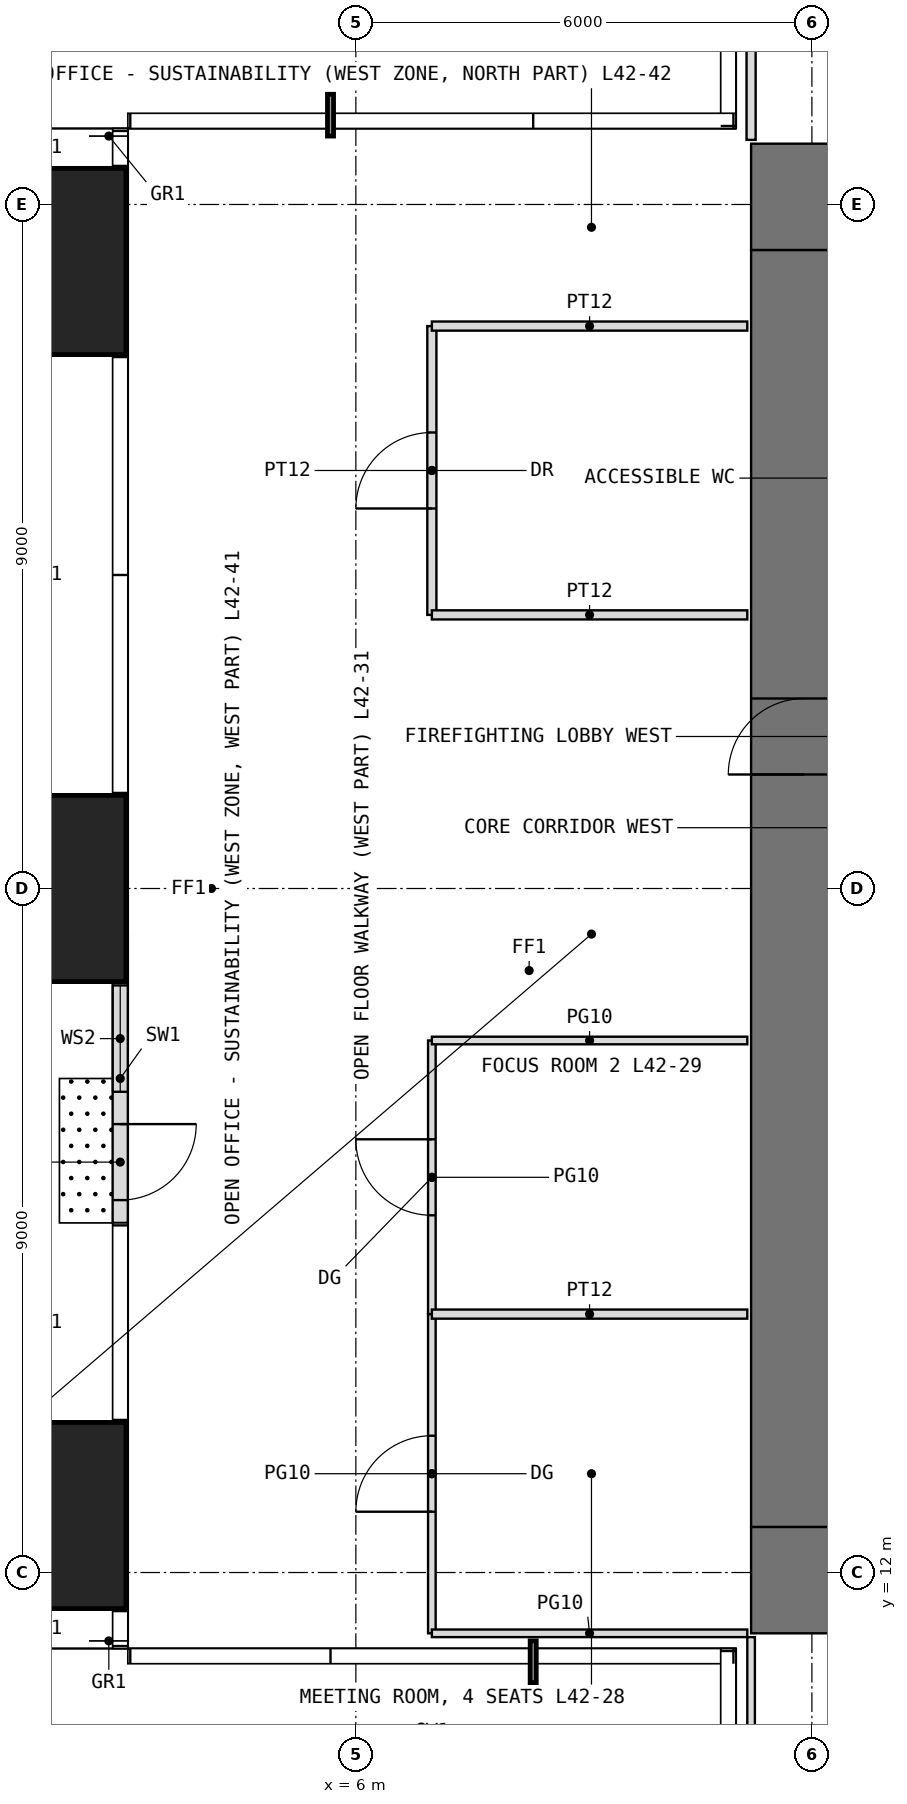
"""IFC4 building model, lengths in metres.
Left out: names, types, materials, properties, quantities, classifications, styles, units other than length and angle.
Written with IfcOpenShell. Run it as: python <this file> out.ifc"""

import sys

from ifc_helpers import new_model, si_unit, direction, frame, frame_2d, origin, origin_2d, place, context, subcontext, project, spatial, rectangle, extrude, element, fill, save


model = new_model("IFC4")
c1 = context("Model", 3, precision=1e-05, world=origin(), true_north=direction((0.0, 1.0)))
c2 = subcontext(c1, "Body", "Model", "MODEL_VIEW")
j1 = project(units=[si_unit("LENGTHUNIT", "METRE"), si_unit("PLANEANGLEUNIT", "RADIAN")], contexts=[c1])
p1 = place(None, origin())
s1 = spatial("IfcSite", under=j1, at=p1, CompositionType="ELEMENT")
p2 = place(p1, origin())
s2 = spatial("IfcBuilding", under=s1, at=p2, CompositionType="ELEMENT")
p3 = place(p2, frame((0.0, 0.0, 178.5)))
s3 = spatial("IfcBuildingStorey", under=s2, at=p3, CompositionType="ELEMENT", Elevation=178.5)
for number, where, z_axis, x_axis in (
    (1, (1.75, 12.75, 0.0), (0.0, 0.0, 1.0), (1.0, 0.0, 0.0)),
    (2, (1.75, 21.0, 0.0), (0.0, 0.0, 1.0), (1.0, 0.0, 0.0)),
    (3, (1.75, 29.25, 0.0), (0.0, 0.0, 1.0), (1.0, 0.0, 0.0)),
):
    element("IfcColumn", number, at=place(p3, frame(where, z_axis=z_axis, x_axis=x_axis)), inside=s3, PredefinedType="COLUMN", context=c2, shape_type="SweptSolid", body=[
        extrude(rectangle(XDim=2.45, YDim=2.45, at=origin_2d()), origin(), (0.0, 0.0, 1.0), 4.0),
    ])
p4 = place(p3, frame((2.9, 20.4, 0.0), z_axis=(0.0, 0.0, 1.0), x_axis=(0.0, -1.0, 0.0)))
e4 = element("IfcWall", 4, at=p4, inside=s3, PredefinedType="USERDEFINED", context=c2, shape_type="SweptSolid", body=[
    extrude(rectangle(XDim=3.8, YDim=0.2, at=frame_2d((1.9, 0.0))), origin(), (0.0, 0.0, 1.0), 3.75),
])
p5 = place(p4, frame((2.5, 0.0, 0.0)))
e5 = element("IfcOpeningElement", 5, at=p5, cuts=e4, PredefinedType="OPENING", context=c2, shape_type="SweptSolid", body=[
    extrude(rectangle(XDim=1.0, YDim=2.4, at=frame_2d((0.5, 1.2))), frame((0.0, 0.11, 0.0), z_axis=(0.0, -1.0, 0.0), x_axis=(1.0, 0.0, 0.0)), (0.0, 0.0, 1.0), 0.22),
])
p6 = place(p4, frame((0.675, 0.0, 0.3)))
e6 = element("IfcOpeningElement", 6, at=p6, cuts=e4, PredefinedType="OPENING", context=c2, shape_type="SweptSolid", body=[
    extrude(rectangle(XDim=1.4, YDim=2.7, at=frame_2d((0.7, 1.35))), frame((0.0, 0.11, 0.0), z_axis=(0.0, -1.0, 0.0), x_axis=(1.0, 0.0, 0.0)), (0.0, 0.0, 1.0), 0.22),
])
p7 = place(p3, frame((11.2, 11.9, -0.05), z_axis=(0.0, 0.0, 1.0), x_axis=(1.0, 0.0, 0.0)))
e7 = element("IfcWall", 7, at=p7, inside=s3, PredefinedType="SHEAR", context=c2, shape_type="SweptSolid", body=[
    extrude(rectangle(XDim=19.6, YDim=1.4, at=frame_2d((9.8, 0.0))), origin(), (0.0, 0.0, 1.0), 4.0),
])
p8 = place(p7, frame((8.8, 0.0, 0.05)))
e8 = element("IfcOpeningElement", 8, at=p8, cuts=e7, PredefinedType="OPENING", context=c2, shape_type="SweptSolid", body=[
    extrude(rectangle(XDim=2.0, YDim=2.2, at=frame_2d((1.0, 1.1))), frame((0.0, 0.71, 0.0), z_axis=(0.0, -1.0, 0.0), x_axis=(1.0, 0.0, 0.0)), (0.0, 0.0, 1.0), 1.42),
])
p9 = place(p3, frame((11.2, 30.1, -0.05), z_axis=(0.0, 0.0, 1.0), x_axis=(1.0, 0.0, 0.0)))
e9 = element("IfcWall", 9, at=p9, inside=s3, PredefinedType="SHEAR", context=c2, shape_type="SweptSolid", body=[
    extrude(rectangle(XDim=19.6, YDim=1.4, at=frame_2d((9.8, 0.0))), origin(), (0.0, 0.0, 1.0), 4.0),
])
p10 = place(p9, frame((8.8, 0.0, 0.05)))
e10 = element("IfcOpeningElement", 10, at=p10, cuts=e9, PredefinedType="OPENING", context=c2, shape_type="SweptSolid", body=[
    extrude(rectangle(XDim=2.0, YDim=2.2, at=frame_2d((1.0, 1.1))), frame((0.0, 0.71, 0.0), z_axis=(0.0, -1.0, 0.0), x_axis=(1.0, 0.0, 0.0)), (0.0, 0.0, 1.0), 1.42),
])
p11 = place(p3, frame((11.9, 12.6, -0.05), z_axis=(0.0, 0.0, 1.0), x_axis=(0.0, 1.0, 0.0)))
e11 = element("IfcWall", 11, at=p11, inside=s3, PredefinedType="SHEAR", context=c2, shape_type="SweptSolid", body=[
    extrude(rectangle(XDim=16.8, YDim=1.4, at=frame_2d((8.4, 0.0))), origin(), (0.0, 0.0, 1.0), 4.0),
])
p12 = place(p11, frame((9.9, 0.0, 0.05)))
e12 = element("IfcOpeningElement", 12, at=p12, cuts=e11, PredefinedType="OPENING", context=c2, shape_type="SweptSolid", body=[
    extrude(rectangle(XDim=1.0, YDim=2.2, at=frame_2d((0.5, 1.1))), frame((0.0, 0.71, 0.0), z_axis=(0.0, -1.0, 0.0), x_axis=(1.0, 0.0, 0.0)), (0.0, 0.0, 1.0), 1.42),
])
p13 = place(p3, frame((7.0, 11.2, 0.0), z_axis=(0.0, 0.0, 1.0), x_axis=(0.0, 1.0, 0.0)))
e13 = element("IfcWall", 13, at=p13, inside=s3, PredefinedType="PARTITIONING", context=c2, shape_type="SweptSolid", body=[
    extrude(rectangle(XDim=4.2, YDim=0.1, at=frame_2d((2.1, 0.0))), origin(), (0.0, 0.0, 1.0), 3.75),
])
p14 = place(p13, frame((1.6, 0.0, 0.0)))
e14 = element("IfcOpeningElement", 14, at=p14, cuts=e13, PredefinedType="OPENING", context=c2, shape_type="SweptSolid", body=[
    extrude(rectangle(XDim=1.0, YDim=2.4, at=frame_2d((0.5, 1.2))), frame((0.0, 0.06, 0.0), z_axis=(0.0, -1.0, 0.0), x_axis=(1.0, 0.0, 0.0)), (0.0, 0.0, 1.0), 0.12),
])
p15 = place(p3, frame((7.0, 11.2, 0.0), z_axis=(0.0, 0.0, 1.0), x_axis=(1.0, 0.0, 0.0)))
e15 = element("IfcWall", 15, at=p15, inside=s3, PredefinedType="PARTITIONING", context=c2, shape_type="SweptSolid", body=[
    extrude(rectangle(XDim=4.15, YDim=0.1, at=frame_2d((2.075, 0.0))), origin(), (0.0, 0.0, 1.0), 3.75),
])
p16 = place(p3, frame((7.0, 15.4, 0.0), z_axis=(0.0, 0.0, 1.0), x_axis=(0.0, 1.0, 0.0)))
e16 = element("IfcWall", 16, at=p16, inside=s3, PredefinedType="PARTITIONING", context=c2, shape_type="SweptSolid", body=[
    extrude(rectangle(XDim=3.6, YDim=0.1, at=frame_2d((1.8, 0.0))), origin(), (0.0, 0.0, 1.0), 3.75),
])
p17 = place(p16, frame((1.3, 0.0, 0.0)))
e17 = element("IfcOpeningElement", 17, at=p17, cuts=e16, PredefinedType="OPENING", context=c2, shape_type="SweptSolid", body=[
    extrude(rectangle(XDim=1.0, YDim=2.4, at=frame_2d((0.5, 1.2))), frame((0.0, 0.06, 0.0), z_axis=(0.0, -1.0, 0.0), x_axis=(1.0, 0.0, 0.0)), (0.0, 0.0, 1.0), 0.12),
])
p18 = place(p3, frame((7.0, 15.4, 0.0), z_axis=(0.0, 0.0, 1.0), x_axis=(1.0, 0.0, 0.0)))
e18 = element("IfcWall", 18, at=p18, inside=s3, PredefinedType="PARTITIONING", context=c2, shape_type="SweptSolid", body=[
    extrude(rectangle(XDim=4.15, YDim=0.12, at=frame_2d((2.075, 0.0))), origin(), (0.0, 0.0, 1.0), 3.75),
])
p19 = place(p3, frame((7.0, 19.0, 0.0), z_axis=(0.0, 0.0, 1.0), x_axis=(1.0, 0.0, 0.0)))
e19 = element("IfcWall", 19, at=p19, inside=s3, PredefinedType="PARTITIONING", context=c2, shape_type="SweptSolid", body=[
    extrude(rectangle(XDim=4.15, YDim=0.1, at=frame_2d((2.075, 0.0))), origin(), (0.0, 0.0, 1.0), 3.75),
])
p20 = place(p3, frame((7.0, 24.6, 0.0), z_axis=(0.0, 0.0, 1.0), x_axis=(0.0, 1.0, 0.0)))
e20 = element("IfcWall", 20, at=p20, inside=s3, PredefinedType="PARTITIONING", context=c2, shape_type="SweptSolid", body=[
    extrude(rectangle(XDim=3.8, YDim=0.12, at=frame_2d((1.9, 0.0))), origin(), (0.0, 0.0, 1.0), 3.75),
])
p21 = place(p20, frame((1.4, 0.0, 0.0)))
e21 = element("IfcOpeningElement", 21, at=p21, cuts=e20, PredefinedType="OPENING", context=c2, shape_type="SweptSolid", body=[
    extrude(rectangle(XDim=1.0, YDim=2.2, at=frame_2d((0.5, 1.1))), frame((0.0, 0.07, 0.0), z_axis=(0.0, -1.0, 0.0), x_axis=(1.0, 0.0, 0.0)), (0.0, 0.0, 1.0), 0.14),
])
for number, where, z_axis, x_axis in (
    (22, (7.0, 24.6, 0.0), (0.0, 0.0, 1.0), (1.0, 0.0, 0.0)),
    (23, (7.0, 28.4, 0.0), (0.0, 0.0, 1.0), (1.0, 0.0, 0.0)),
):
    element("IfcWall", number, at=place(p3, frame(where, z_axis=z_axis, x_axis=x_axis)), inside=s3, PredefinedType="PARTITIONING", context=c2, shape_type="SweptSolid", body=[
        extrude(rectangle(XDim=4.15, YDim=0.12, at=frame_2d((2.075, 0.0))), origin(), (0.0, 0.0, 1.0), 3.75),
    ])
p22 = place(p3, frame((11.2, 6.2, 0.0), z_axis=(0.0, 0.0, 1.0), x_axis=(0.0, 1.0, 0.0)))
e24 = element("IfcWall", 24, at=p22, inside=s3, PredefinedType="PARTITIONING", context=c2, shape_type="SweptSolid", body=[
    extrude(rectangle(XDim=4.95, YDim=0.1, at=frame_2d((2.475, 0.0))), origin(), (0.0, 0.0, 1.0), 3.75),
])
p23 = place(p3, frame((11.2, 30.85, 0.0), z_axis=(0.0, 0.0, 1.0), x_axis=(0.0, 1.0, 0.0)))
e25 = element("IfcWall", 25, at=p23, inside=s3, PredefinedType="PARTITIONING", context=c2, shape_type="SweptSolid", body=[
    extrude(rectangle(XDim=2.65, YDim=0.12, at=frame_2d((1.325, 0.0))), origin(), (0.0, 0.0, 1.0), 3.75),
])
p24 = place(p5, origin())
e26 = element("IfcDoor", 26, at=p24, inside=s3, OperationType="SINGLE_SWING_LEFT", PredefinedType="DOOR", context=c2, shape_type="SweptSolid", body=[
    extrude(rectangle(XDim=1.0, YDim=2.4, at=frame_2d((0.5, 1.2))), frame((0.0, 0.025, 0.0), z_axis=(0.0, -1.0, 0.0), x_axis=(1.0, 0.0, 0.0)), (0.0, 0.0, 1.0), 0.05),
])
fill(e5, e26)
p25 = place(p6, origin())
e27 = element("IfcWindow", 27, at=p25, inside=s3, PartitioningType="SINGLE_PANEL", PredefinedType="WINDOW", context=c2, shape_type="SweptSolid", body=[
    extrude(rectangle(XDim=1.4, YDim=2.7, at=frame_2d((0.7, 1.35))), frame((0.0, 0.03, 0.0), z_axis=(0.0, -1.0, 0.0), x_axis=(1.0, 0.0, 0.0)), (0.0, 0.0, 1.0), 0.06),
])
fill(e6, e27)
p26 = place(p12, origin())
e28 = element("IfcDoor", 28, at=p26, inside=s3, OperationType="SINGLE_SWING_LEFT", PredefinedType="DOOR", context=c2, shape_type="SweptSolid", body=[
    extrude(rectangle(XDim=1.0, YDim=2.2, at=frame_2d((0.5, 1.1))), frame((0.0, 0.025, 0.0), z_axis=(0.0, -1.0, 0.0), x_axis=(1.0, 0.0, 0.0)), (0.0, 0.0, 1.0), 0.05),
])
fill(e12, e28)
p27 = place(p14, origin())
e29 = element("IfcDoor", 29, at=p27, inside=s3, OperationType="SINGLE_SWING_LEFT", PredefinedType="DOOR", context=c2, shape_type="SweptSolid", body=[
    extrude(rectangle(XDim=1.0, YDim=2.4, at=frame_2d((0.5, 1.2))), frame((0.0, 0.025, 0.0), z_axis=(0.0, -1.0, 0.0), x_axis=(1.0, 0.0, 0.0)), (0.0, 0.0, 1.0), 0.05),
])
fill(e14, e29)
p28 = place(p17, origin())
e30 = element("IfcDoor", 30, at=p28, inside=s3, OperationType="SINGLE_SWING_RIGHT", PredefinedType="DOOR", context=c2, shape_type="SweptSolid", body=[
    extrude(rectangle(XDim=1.0, YDim=2.4, at=frame_2d((0.5, 1.2))), frame((0.0, 0.025, 0.0), z_axis=(0.0, -1.0, 0.0), x_axis=(1.0, 0.0, 0.0)), (0.0, 0.0, 1.0), 0.05),
])
fill(e17, e30)
p29 = place(p21, origin())
e31 = element("IfcDoor", 31, at=p29, inside=s3, OperationType="SINGLE_SWING_LEFT", PredefinedType="DOOR", context=c2, shape_type="SweptSolid", body=[
    extrude(rectangle(XDim=1.0, YDim=2.2, at=frame_2d((0.5, 1.1))), frame((0.0, 0.025, 0.0), z_axis=(0.0, -1.0, 0.0), x_axis=(1.0, 0.0, 0.0)), (0.0, 0.0, 1.0), 0.05),
])
fill(e21, e31)
save(model, sys.argv[1])
